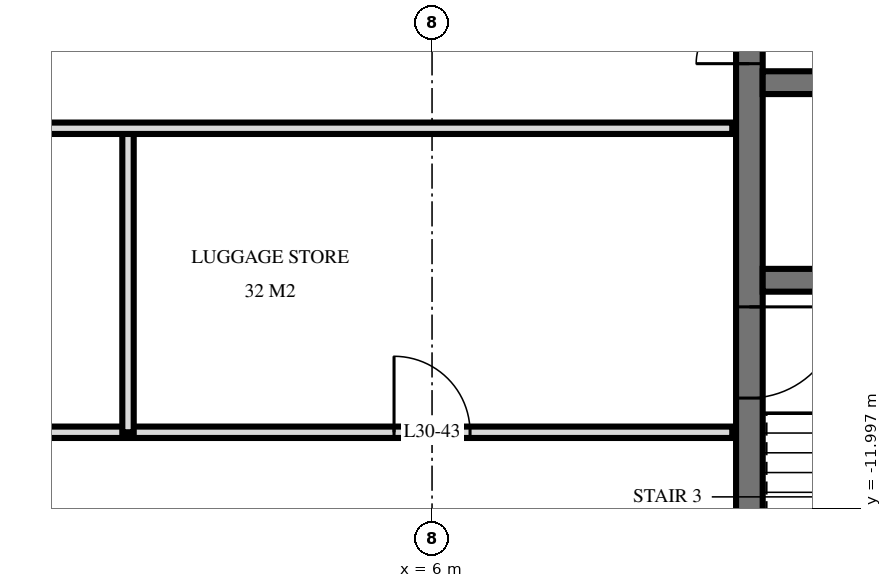
"""IFC4 building model, lengths in metres.
Left out: names, types, materials, properties, quantities, classifications, styles, units other than length and angle.
Written with IfcOpenShell. Run it as: python <this file> out.ifc"""

import sys

from ifc_helpers import new_model, si_unit, direction, frame, frame_2d, origin, place, context, subcontext, project, spatial, rectangle, extrude, element, fill, save


model = new_model("IFC4")
c1 = context("Model", 3, precision=1e-05, world=origin(), true_north=direction((0.0, 1.0)))
c2 = subcontext(c1, "Body", "Model", "MODEL_VIEW")
j1 = project(units=[si_unit("LENGTHUNIT", "METRE"), si_unit("PLANEANGLEUNIT", "RADIAN")], contexts=[c1])
p1 = place(None, origin())
s1 = spatial("IfcSite", under=j1, at=p1, CompositionType="ELEMENT")
p2 = place(p1, origin())
s2 = spatial("IfcBuilding", under=s1, at=p2, CompositionType="ELEMENT")
p3 = place(p2, frame((0.0, 0.0, 120.0)))
s3 = spatial("IfcBuildingStorey", under=s2, at=p3, CompositionType="ELEMENT", Elevation=120.0)
p4 = place(p3, frame((10.175, -14.55, 0.0), z_axis=(0.0, 0.0, 1.0), x_axis=(0.0, 1.0, 0.0)))
e1 = element("IfcWall", 1, at=p4, inside=s3, PredefinedType="SHEAR", context=c2, shape_type="SweptSolid", body=[
    extrude(rectangle(XDim=14.1, YDim=0.35, at=frame_2d((7.05, 0.0))), origin(), (0.0, 0.0, 1.0), 3.6),
])
p5 = place(p4, frame((8.4, 0.0, 0.0)))
e2 = element("IfcOpeningElement", 2, at=p5, cuts=e1, PredefinedType="OPENING", context=c2, shape_type="SweptSolid", body=[
    extrude(rectangle(XDim=1.4, YDim=2.4, at=frame_2d((0.7, 1.2))), frame((0.0, 0.185, 0.0), z_axis=(0.0, -1.0, 0.0), x_axis=(1.0, 0.0, 0.0)), (0.0, 0.0, 1.0), 0.37),
])
p6 = place(p4, frame((10.0, 0.0, 0.0)))
e3 = element("IfcOpeningElement", 3, at=p6, cuts=e1, PredefinedType="OPENING", context=c2, shape_type="SweptSolid", body=[
    extrude(rectangle(XDim=1.4, YDim=2.4, at=frame_2d((0.7, 1.2))), frame((0.0, 0.185, 0.0), z_axis=(0.0, -1.0, 0.0), x_axis=(1.0, 0.0, 0.0)), (0.0, 0.0, 1.0), 0.37),
])
p7 = place(p4, frame((4.0, 0.0, 0.0)))
e4 = element("IfcOpeningElement", 4, at=p7, cuts=e1, PredefinedType="OPENING", context=c2, shape_type="SweptSolid", body=[
    extrude(rectangle(XDim=1.2, YDim=2.1, at=frame_2d((0.6, 1.05))), frame((0.0, 0.185, 0.0), z_axis=(0.0, -1.0, 0.0), x_axis=(1.0, 0.0, 0.0)), (0.0, 0.0, 1.0), 0.37),
])
p8 = place(p3, frame((10.35, -6.4, 0.0), z_axis=(0.0, 0.0, 1.0), x_axis=(1.0, 0.0, 0.0)))
e5 = element("IfcWall", 5, at=p8, inside=s3, PredefinedType="SHEAR", context=c2, shape_type="SweptSolid", body=[
    extrude(rectangle(XDim=13.7, YDim=0.3, at=frame_2d((6.85, 0.0))), origin(), (0.0, 0.0, 1.0), 3.6),
])
p9 = place(p8, frame((12.05, 0.0, 0.0)))
e6 = element("IfcOpeningElement", 6, at=p9, cuts=e5, PredefinedType="OPENING", context=c2, shape_type="SweptSolid", body=[
    extrude(rectangle(XDim=1.1, YDim=2.1, at=frame_2d((0.55, 1.05))), frame((0.0, 0.16, 0.0), z_axis=(0.0, -1.0, 0.0), x_axis=(1.0, 0.0, 0.0)), (0.0, 0.0, 1.0), 0.32),
])
p10 = place(p8, frame((6.8, 0.0, 0.0)))
e7 = element("IfcOpeningElement", 7, at=p10, cuts=e5, PredefinedType="OPENING", context=c2, shape_type="SweptSolid", body=[
    extrude(rectangle(XDim=1.1, YDim=2.1, at=frame_2d((0.55, 1.05))), frame((0.0, 0.16, 0.0), z_axis=(0.0, -1.0, 0.0), x_axis=(1.0, 0.0, 0.0)), (0.0, 0.0, 1.0), 0.32),
])
p11 = place(p3, frame((10.35, -9.0, 0.0), z_axis=(0.0, 0.0, 1.0), x_axis=(1.0, 0.0, 0.0)))
e8 = element("IfcWall", 8, at=p11, inside=s3, PredefinedType="SHEAR", context=c2, shape_type="SweptSolid", body=[
    extrude(rectangle(XDim=13.7, YDim=0.3, at=frame_2d((6.85, 0.0))), origin(), (0.0, 0.0, 1.0), 3.6),
])
p12 = place(p11, frame((3.8, 0.0, 0.0)))
e9 = element("IfcOpeningElement", 9, at=p12, cuts=e8, PredefinedType="OPENING", context=c2, shape_type="SweptSolid", body=[
    extrude(rectangle(XDim=1.1, YDim=2.1, at=frame_2d((0.55, 1.05))), frame((0.0, 0.16, 0.0), z_axis=(0.0, -1.0, 0.0), x_axis=(1.0, 0.0, 0.0)), (0.0, 0.0, 1.0), 0.32),
])
p13 = place(p3, frame((2.0, -11.0, 0.0), z_axis=(0.0, 0.0, 1.0), x_axis=(0.0, 1.0, 0.0)))
e10 = element("IfcWall", 10, at=p13, inside=s3, PredefinedType="PARTITIONING", context=c2, shape_type="SweptSolid", body=[
    extrude(rectangle(XDim=4.0, YDim=0.15, at=frame_2d((2.0, 0.0))), origin(), (0.0, 0.0, 1.0), 3.32),
])
p14 = place(p3, frame((-9.95, -11.0, 0.0), z_axis=(0.0, 0.0, 1.0), x_axis=(1.0, 0.0, 0.0)))
e11 = element("IfcWall", 11, at=p14, inside=s3, PredefinedType="PARTITIONING", context=c2, shape_type="SweptSolid", body=[
    extrude(rectangle(XDim=19.9, YDim=0.15, at=frame_2d((9.95, 0.0))), origin(), (0.0, 0.0, 1.0), 3.32),
])
p15 = place(p14, frame((9.45, 0.0, 0.0)))
e12 = element("IfcOpeningElement", 12, at=p15, cuts=e11, PredefinedType="OPENING", context=c2, shape_type="SweptSolid", body=[
    extrude(rectangle(XDim=1.0, YDim=2.1, at=frame_2d((0.5, 1.05))), frame((0.0, 0.085, 0.0), z_axis=(0.0, -1.0, 0.0), x_axis=(1.0, 0.0, 0.0)), (0.0, 0.0, 1.0), 0.17),
])
p16 = place(p14, frame((15.45, 0.0, 0.0)))
e13 = element("IfcOpeningElement", 13, at=p16, cuts=e11, PredefinedType="OPENING", context=c2, shape_type="SweptSolid", body=[
    extrude(rectangle(XDim=1.0, YDim=2.1, at=frame_2d((0.5, 1.05))), frame((0.0, 0.085, 0.0), z_axis=(0.0, -1.0, 0.0), x_axis=(1.0, 0.0, 0.0)), (0.0, 0.0, 1.0), 0.17),
])
p17 = place(p3, frame((-9.95, -7.0, 0.0), z_axis=(0.0, 0.0, 1.0), x_axis=(1.0, 0.0, 0.0)))
e14 = element("IfcWall", 14, at=p17, inside=s3, PredefinedType="PARTITIONING", context=c2, shape_type="SweptSolid", body=[
    extrude(rectangle(XDim=19.9, YDim=0.15, at=frame_2d((9.95, 0.0))), origin(), (0.0, 0.0, 1.0), 3.32),
])
p18 = place(p17, frame((9.45, 0.0, 0.0)))
e15 = element("IfcOpeningElement", 15, at=p18, cuts=e14, PredefinedType="OPENING", context=c2, shape_type="SweptSolid", body=[
    extrude(rectangle(XDim=1.0, YDim=2.1, at=frame_2d((0.5, 1.05))), frame((0.0, 0.085, 0.0), z_axis=(0.0, -1.0, 0.0), x_axis=(1.0, 0.0, 0.0)), (0.0, 0.0, 1.0), 0.17),
])
p19 = place(p17, frame((3.45, 0.0, 0.0)))
e16 = element("IfcOpeningElement", 16, at=p19, cuts=e14, PredefinedType="OPENING", context=c2, shape_type="SweptSolid", body=[
    extrude(rectangle(XDim=1.0, YDim=2.1, at=frame_2d((0.5, 1.05))), frame((0.0, 0.085, 0.0), z_axis=(0.0, -1.0, 0.0), x_axis=(1.0, 0.0, 0.0)), (0.0, 0.0, 1.0), 0.17),
])
p20 = place(p5, origin())
e17 = element("IfcDoor", 17, at=p20, inside=s3, OperationType="DOUBLE_DOOR_SINGLE_SWING", PredefinedType="DOOR", context=c2, shape_type="SweptSolid", body=[
    extrude(rectangle(XDim=1.4, YDim=2.4, at=frame_2d((0.7, 1.2))), frame((0.0, 0.025, 0.0), z_axis=(0.0, -1.0, 0.0), x_axis=(1.0, 0.0, 0.0)), (0.0, 0.0, 1.0), 0.05),
])
fill(e2, e17)
p21 = place(p7, frame((0.6, 0.0, 0.0), z_axis=(0.0, 0.0, 1.0), x_axis=(-1.0, 0.0, 0.0)))
e18 = element("IfcDoor", 18, at=p21, inside=s3, OperationType="SINGLE_SWING_RIGHT", PredefinedType="DOOR", context=c2, shape_type="SweptSolid", body=[
    extrude(rectangle(XDim=1.2, YDim=2.1, at=frame_2d((0.0, 1.05))), frame((0.0, -0.025, 0.0), z_axis=(0.0, 1.0, 0.0), x_axis=(-1.0, 0.0, 0.0)), (0.0, 0.0, 1.0), 0.05),
])
fill(e4, e18)
p22 = place(p16, origin())
e19 = element("IfcDoor", 19, at=p22, inside=s3, OperationType="SINGLE_SWING_RIGHT", PredefinedType="DOOR", context=c2, shape_type="SweptSolid", body=[
    extrude(rectangle(XDim=1.0, YDim=2.1, at=frame_2d((0.5, 1.05))), frame((0.0, 0.025, 0.0), z_axis=(0.0, -1.0, 0.0), x_axis=(1.0, 0.0, 0.0)), (0.0, 0.0, 1.0), 0.05),
])
fill(e13, e19)
save(model, sys.argv[1])
